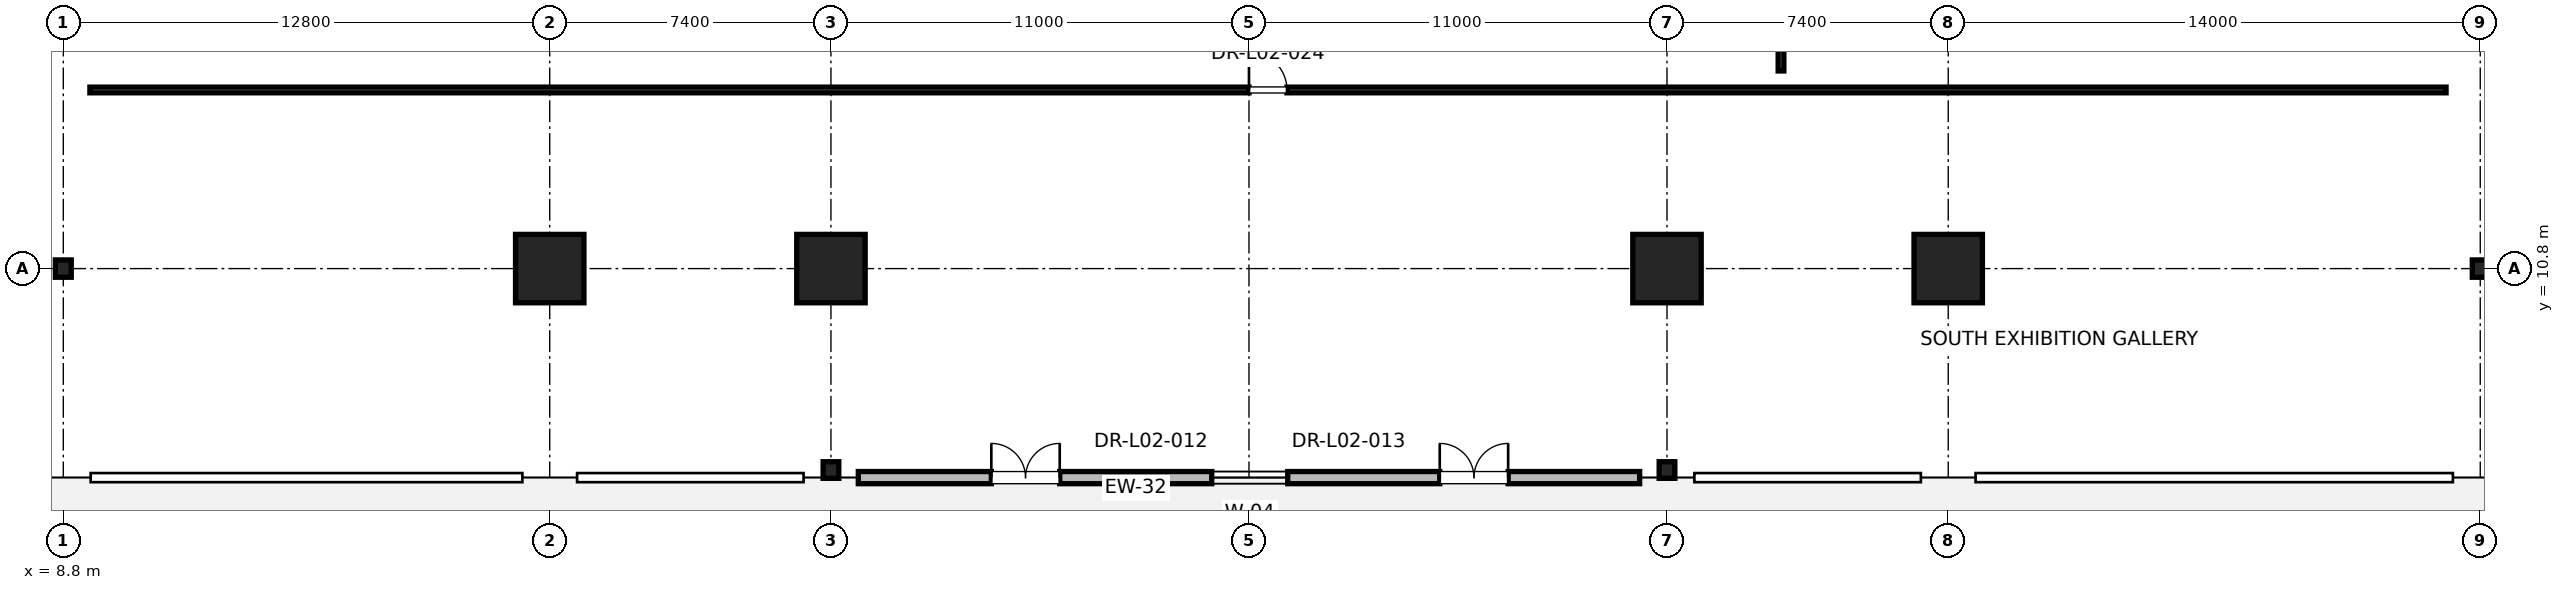
"""IFC4 building model, lengths in metres.
Left out: names, types, materials, properties, quantities, classifications, styles, units other than length and angle.
Written with IfcOpenShell. Run it as: python <this file> out.ifc"""

import sys

from ifc_helpers import new_model, si_unit, direction, frame, frame_2d, origin, origin_2d, place, context, subcontext, project, spatial, rectangle, i_section, extrude, element, fill, save


model = new_model("IFC4")
c1 = context("Model", 3, precision=1e-05, world=origin(), true_north=direction((0.0, 1.0)))
c2 = subcontext(c1, "Body", "Model", "MODEL_VIEW")
j1 = project(units=[si_unit("LENGTHUNIT", "METRE"), si_unit("PLANEANGLEUNIT", "RADIAN")], contexts=[c1])
p1 = place(None, origin())
s1 = spatial("IfcSite", under=j1, at=p1, CompositionType="ELEMENT")
p2 = place(p1, origin())
s2 = spatial("IfcBuilding", under=s1, at=p2, CompositionType="ELEMENT")
p3 = place(p2, frame((0.0, 0.0, 11.2)))
s3 = spatial("IfcBuildingStorey", under=s2, at=p3, CompositionType="ELEMENT", Elevation=11.2)
for number, where, z_axis, x_axis in (
    (1, (29.0, 10.8, 0.0), (0.0, 0.0, 1.0), (1.0, 0.0, 0.0)),
    (2, (51.0, 10.8, 0.0), (0.0, 0.0, 1.0), (1.0, 0.0, 0.0)),
    (3, (21.6, 10.8, 0.0), (0.0, 0.0, 1.0), (1.0, 0.0, 0.0)),
    (4, (58.4, 10.8, 0.0), (0.0, 0.0, 1.0), (1.0, 0.0, 0.0)),
):
    element("IfcColumn", number, at=place(p3, frame(where, z_axis=z_axis, x_axis=x_axis)), inside=s3, PredefinedType="COLUMN", context=c2, shape_type="SweptSolid", body=[
        extrude(rectangle(XDim=1.8, YDim=1.8, at=origin_2d()), origin(), (0.0, 0.0, 1.0), 5.2),
    ])
for number, where, z_axis, x_axis in (
    (5, (29.0, 5.5, 0.0), (0.0, 0.0, 1.0), (1.0, 0.0, 0.0)),
    (6, (51.0, 5.5, 0.0), (0.0, 0.0, 1.0), (1.0, 0.0, 0.0)),
):
    element("IfcColumn", number, at=place(p3, frame(where, z_axis=z_axis, x_axis=x_axis)), inside=s3, PredefinedType="COLUMN", context=c2, shape_type="SweptSolid", body=[
        extrude(i_section(OverallWidth=0.412, OverallDepth=0.437, WebThickness=0.036, FlangeThickness=0.058, FilletRadius=0.015, at=origin_2d()), origin(), (0.0, 0.0, 1.0), 5.2),
    ])
for number, where, z_axis, x_axis in (
    (7, (8.8, 10.8, 0.0), (0.0, 0.0, 1.0), (1.0, 0.0, 0.0)),
    (8, (72.4, 10.8, 0.0), (0.0, 0.0, 1.0), (1.0, 0.0, 0.0)),
):
    element("IfcColumn", number, at=place(p3, frame(where, z_axis=z_axis, x_axis=x_axis)), inside=s3, PredefinedType="COLUMN", context=c2, shape_type="SweptSolid", body=[
        extrude(i_section(OverallWidth=0.418, OverallDepth=0.456, WebThickness=0.042, FlangeThickness=0.067, FilletRadius=0.015, at=origin_2d()), origin(), (0.0, 0.0, 1.0), 5.2),
    ])
p4 = place(p3, frame((29.72, 5.3, 0.0), z_axis=(0.0, 0.0, 1.0), x_axis=(1.0, 0.0, 0.0)))
e9 = element("IfcWall", 9, at=p4, inside=s3, PredefinedType="SOLIDWALL", context=c2, shape_type="SweptSolid", body=[
    extrude(rectangle(XDim=20.56, YDim=0.32, at=frame_2d((10.28, 0.0))), origin(), (0.0, 0.0, 1.0), 3.53),
])
p5 = place(p4, frame((3.5, 0.0, 0.0)))
e10 = element("IfcOpeningElement", 10, at=p5, cuts=e9, PredefinedType="OPENING", context=c2, shape_type="SweptSolid", body=[
    extrude(rectangle(XDim=1.8, YDim=2.4, at=frame_2d((0.9, 1.2))), frame((0.0, 0.16, 0.0), z_axis=(0.0, -1.0, 0.0), x_axis=(1.0, 0.0, 0.0)), (0.0, 0.0, 1.0), 0.32),
])
p6 = place(p4, frame((9.3, 0.0, 0.9)))
e11 = element("IfcOpeningElement", 11, at=p6, cuts=e9, PredefinedType="OPENING", context=c2, shape_type="SweptSolid", body=[
    extrude(rectangle(XDim=2.0, YDim=2.3, at=frame_2d((1.0, 1.15))), frame((0.0, 0.16, 0.0), z_axis=(0.0, -1.0, 0.0), x_axis=(1.0, 0.0, 0.0)), (0.0, 0.0, 1.0), 0.32),
])
p7 = place(p4, frame((15.3, 0.0, 0.0)))
e12 = element("IfcOpeningElement", 12, at=p7, cuts=e9, PredefinedType="OPENING", context=c2, shape_type="SweptSolid", body=[
    extrude(rectangle(XDim=1.8, YDim=2.4, at=frame_2d((0.9, 1.2))), frame((0.0, 0.16, 0.0), z_axis=(0.0, -1.0, 0.0), x_axis=(1.0, 0.0, 0.0)), (0.0, 0.0, 1.0), 0.32),
])
p8 = place(p3, frame((9.5, 15.5, 0.0), z_axis=(0.0, 0.0, 1.0), x_axis=(1.0, 0.0, 0.0)))
e13 = element("IfcWall", 13, at=p8, inside=s3, PredefinedType="PARTITIONING", context=c2, shape_type="SweptSolid", body=[
    extrude(rectangle(XDim=62.0, YDim=0.15, at=frame_2d((31.0, 0.0))), origin(), (0.0, 0.0, 1.0), 2.85),
])
p9 = place(p8, frame((30.5, 0.0, 0.0)))
e14 = element("IfcOpeningElement", 14, at=p9, cuts=e13, PredefinedType="OPENING", context=c2, shape_type="SweptSolid", body=[
    extrude(rectangle(XDim=1.0, YDim=2.15, at=frame_2d((0.5, 1.075))), frame((0.0, 0.075, 0.0), z_axis=(0.0, -1.0, 0.0), x_axis=(1.0, 0.0, 0.0)), (0.0, 0.0, 1.0), 0.15),
])
p10 = place(p3, frame((54.0, 16.0, 0.0), z_axis=(0.0, 0.0, 1.0), x_axis=(0.0, 1.0, 0.0)))
e15 = element("IfcWall", 15, at=p10, inside=s3, PredefinedType="PARTITIONING", context=c2, shape_type="SweptSolid", body=[
    extrude(rectangle(XDim=14.45, YDim=0.15, at=frame_2d((7.225, 0.0))), origin(), (0.0, 0.0, 1.0), 2.85),
])
p11 = place(p10, frame((8.025, 0.0, 0.0)))
e16 = element("IfcOpeningElement", 16, at=p11, cuts=e15, PredefinedType="OPENING", context=c2, shape_type="SweptSolid", body=[
    extrude(rectangle(XDim=1.0, YDim=2.15, at=frame_2d((0.5, 1.075))), frame((0.0, 0.075, 0.0), z_axis=(0.0, -1.0, 0.0), x_axis=(1.0, 0.0, 0.0)), (0.0, 0.0, 1.0), 0.15),
])
p12 = place(p5, origin())
e17 = element("IfcDoor", 17, at=p12, inside=s3, OperationType="DOUBLE_DOOR_SINGLE_SWING", PredefinedType="DOOR", context=c2, shape_type="SweptSolid", body=[
    extrude(rectangle(XDim=1.8, YDim=2.4, at=frame_2d((0.9, 1.2))), frame((0.0, 0.025, 0.0), z_axis=(0.0, -1.0, 0.0), x_axis=(1.0, 0.0, 0.0)), (0.0, 0.0, 1.0), 0.05),
])
fill(e10, e17)
p13 = place(p6, origin())
e18 = element("IfcWindow", 18, at=p13, inside=s3, PartitioningType="SINGLE_PANEL", PredefinedType="WINDOW", context=c2, shape_type="SweptSolid", body=[
    extrude(rectangle(XDim=2.0, YDim=2.3, at=frame_2d((1.0, 1.15))), frame((0.0, 0.03, 0.0), z_axis=(0.0, -1.0, 0.0), x_axis=(1.0, 0.0, 0.0)), (0.0, 0.0, 1.0), 0.06),
])
fill(e11, e18)
p14 = place(p7, origin())
e19 = element("IfcDoor", 19, at=p14, inside=s3, OperationType="DOUBLE_DOOR_SINGLE_SWING", PredefinedType="DOOR", context=c2, shape_type="SweptSolid", body=[
    extrude(rectangle(XDim=1.8, YDim=2.4, at=frame_2d((0.9, 1.2))), frame((0.0, 0.025, 0.0), z_axis=(0.0, -1.0, 0.0), x_axis=(1.0, 0.0, 0.0)), (0.0, 0.0, 1.0), 0.05),
])
fill(e12, e19)
p15 = place(p9, origin())
e20 = element("IfcDoor", 20, at=p15, inside=s3, OperationType="SINGLE_SWING_LEFT", PredefinedType="DOOR", context=c2, shape_type="SweptSolid", body=[
    extrude(rectangle(XDim=1.0, YDim=2.15, at=frame_2d((0.5, 1.075))), frame((0.0, 0.025, 0.0), z_axis=(0.0, -1.0, 0.0), x_axis=(1.0, 0.0, 0.0)), (0.0, 0.0, 1.0), 0.05),
])
fill(e14, e20)
save(model, sys.argv[1])
